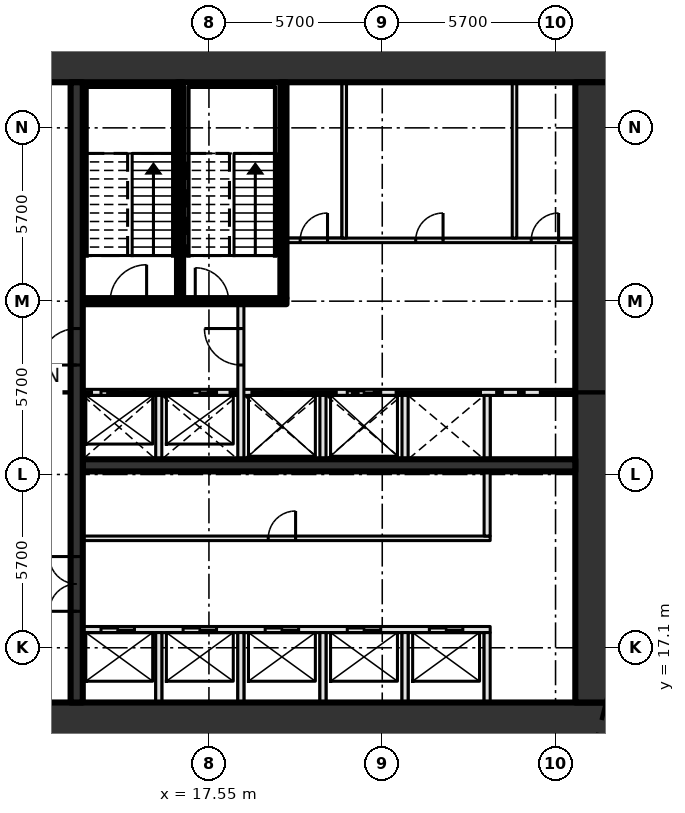
"""IFC4 building model, lengths in metres.
Left out: names, types, materials, properties, quantities, classifications, styles, units other than length and angle.
Written with IfcOpenShell. Run it as: python <this file> out.ifc"""

import sys

from ifc_helpers import new_model, si_unit, direction, frame, frame_2d, origin, place, context, subcontext, project, spatial, rectangle, extrude, element, fill, save


model = new_model("IFC4")
c1 = context("Model", 3, precision=1e-05, world=origin(), true_north=direction((0.0, 1.0)))
c2 = subcontext(c1, "Body", "Model", "MODEL_VIEW")
j1 = project(units=[si_unit("LENGTHUNIT", "METRE"), si_unit("PLANEANGLEUNIT", "RADIAN")], contexts=[c1])
p1 = place(None, origin())
s1 = spatial("IfcSite", under=j1, at=p1, CompositionType="ELEMENT")
p2 = place(p1, origin())
s2 = spatial("IfcBuilding", under=s1, at=p2, CompositionType="ELEMENT")
p3 = place(p2, frame((0.0, 0.0, 23.4)))
s3 = spatial("IfcBuildingStorey", under=s2, at=p3, CompositionType="ELEMENT", Elevation=23.4)
p4 = place(p3, frame((8.0, 14.7, -0.45), z_axis=(0.0, 0.0, 1.0), x_axis=(1.0, 0.0, 0.0)))
e1 = element("IfcWall", 1, at=p4, inside=s3, PredefinedType="SHEAR", context=c2, shape_type="SweptSolid", body=[
    extrude(rectangle(XDim=22.8, YDim=1.2, at=frame_2d((11.4, 0.0))), origin(), (0.0, 0.0, 1.0), 4.8),
])
p5 = place(p4, frame((2.3, 0.0, 0.45)))
e2 = element("IfcOpeningElement", 2, at=p5, cuts=e1, PredefinedType="OPENING", context=c2, shape_type="SweptSolid", body=[
    extrude(rectangle(XDim=1.8, YDim=2.1, at=frame_2d((0.9, 1.05))), frame((0.0, 0.61, 0.0), z_axis=(0.0, -1.0, 0.0), x_axis=(1.0, 0.0, 0.0)), (0.0, 0.0, 1.0), 1.22),
])
p6 = place(p3, frame((8.0, 36.3, -0.45), z_axis=(0.0, 0.0, 1.0), x_axis=(1.0, 0.0, 0.0)))
e3 = element("IfcWall", 3, at=p6, inside=s3, PredefinedType="SHEAR", context=c2, shape_type="SweptSolid", body=[
    extrude(rectangle(XDim=22.8, YDim=1.2, at=frame_2d((11.4, 0.0))), origin(), (0.0, 0.0, 1.0), 4.8),
])
p7 = place(p6, frame((2.3, 0.0, 0.45)))
e4 = element("IfcOpeningElement", 4, at=p7, cuts=e3, PredefinedType="OPENING", context=c2, shape_type="SweptSolid", body=[
    extrude(rectangle(XDim=1.8, YDim=2.1, at=frame_2d((0.9, 1.05))), frame((0.0, 0.61, 0.0), z_axis=(0.0, -1.0, 0.0), x_axis=(1.0, 0.0, 0.0)), (0.0, 0.0, 1.0), 1.22),
])
p8 = place(p3, frame((30.2, 15.3, -0.45), z_axis=(0.0, 0.0, 1.0), x_axis=(0.0, 1.0, 0.0)))
e5 = element("IfcWall", 5, at=p8, inside=s3, PredefinedType="SHEAR", context=c2, shape_type="SweptSolid", body=[
    extrude(rectangle(XDim=20.4, YDim=1.2, at=frame_2d((10.2, 0.0))), origin(), (0.0, 0.0, 1.0), 4.8),
])
p9 = place(p3, frame((13.4, 17.7, 0.0), z_axis=(0.0, 0.0, 1.0), x_axis=(1.0, 0.0, 0.0)))
e6 = element("IfcWall", 6, at=p9, inside=s3, PredefinedType="SOLIDWALL", context=c2, shape_type="SweptSolid", body=[
    extrude(rectangle(XDim=13.4, YDim=0.2, at=frame_2d((6.7, 0.0))), origin(), (0.0, 0.0, 1.0), 4.35),
])
p10 = place(p9, frame((0.6, 0.0, 0.0)))
e7 = element("IfcOpeningElement", 7, at=p10, cuts=e6, PredefinedType="OPENING", context=c2, shape_type="SweptSolid", body=[
    extrude(rectangle(XDim=1.1, YDim=2.1, at=frame_2d((0.55, 1.05))), frame((0.0, 0.11, 0.0), z_axis=(0.0, -1.0, 0.0), x_axis=(1.0, 0.0, 0.0)), (0.0, 0.0, 1.0), 0.22),
])
p11 = place(p9, frame((3.3, 0.0, 0.0)))
e8 = element("IfcOpeningElement", 8, at=p11, cuts=e6, PredefinedType="OPENING", context=c2, shape_type="SweptSolid", body=[
    extrude(rectangle(XDim=1.1, YDim=2.1, at=frame_2d((0.55, 1.05))), frame((0.0, 0.11, 0.0), z_axis=(0.0, -1.0, 0.0), x_axis=(1.0, 0.0, 0.0)), (0.0, 0.0, 1.0), 0.22),
])
p12 = place(p9, frame((6.0, 0.0, 0.0)))
e9 = element("IfcOpeningElement", 9, at=p12, cuts=e6, PredefinedType="OPENING", context=c2, shape_type="SweptSolid", body=[
    extrude(rectangle(XDim=1.1, YDim=2.1, at=frame_2d((0.55, 1.05))), frame((0.0, 0.11, 0.0), z_axis=(0.0, -1.0, 0.0), x_axis=(1.0, 0.0, 0.0)), (0.0, 0.0, 1.0), 0.22),
])
p13 = place(p9, frame((8.7, 0.0, 0.0)))
e10 = element("IfcOpeningElement", 10, at=p13, cuts=e6, PredefinedType="OPENING", context=c2, shape_type="SweptSolid", body=[
    extrude(rectangle(XDim=1.1, YDim=2.1, at=frame_2d((0.55, 1.05))), frame((0.0, 0.11, 0.0), z_axis=(0.0, -1.0, 0.0), x_axis=(1.0, 0.0, 0.0)), (0.0, 0.0, 1.0), 0.22),
])
p14 = place(p9, frame((11.4, 0.0, 0.0)))
e11 = element("IfcOpeningElement", 11, at=p14, cuts=e6, PredefinedType="OPENING", context=c2, shape_type="SweptSolid", body=[
    extrude(rectangle(XDim=1.1, YDim=2.1, at=frame_2d((0.55, 1.05))), frame((0.0, 0.11, 0.0), z_axis=(0.0, -1.0, 0.0), x_axis=(1.0, 0.0, 0.0)), (0.0, 0.0, 1.0), 0.22),
])
p15 = place(p3, frame((13.4, 20.7, 0.0), z_axis=(0.0, 0.0, 1.0), x_axis=(1.0, 0.0, 0.0)))
e12 = element("IfcWall", 12, at=p15, inside=s3, PredefinedType="PARTITIONING", context=c2, shape_type="SweptSolid", body=[
    extrude(rectangle(XDim=13.4, YDim=0.15, at=frame_2d((6.7, 0.0))), origin(), (0.0, 0.0, 1.0), 4.35),
])
p16 = place(p15, frame((6.1, 0.0, 0.0)))
e13 = element("IfcOpeningElement", 13, at=p16, cuts=e12, PredefinedType="OPENING", context=c2, shape_type="SweptSolid", body=[
    extrude(rectangle(XDim=0.9, YDim=2.1, at=frame_2d((0.45, 1.05))), frame((0.0, 0.085, 0.0), z_axis=(0.0, -1.0, 0.0), x_axis=(1.0, 0.0, 0.0)), (0.0, 0.0, 1.0), 0.17),
])
p17 = place(p3, frame((13.4, 23.1, 0.0), z_axis=(0.0, 0.0, 1.0), x_axis=(1.0, 0.0, 0.0)))
e14 = element("IfcWall", 14, at=p17, inside=s3, PredefinedType="SHEAR", context=c2, shape_type="SweptSolid", body=[
    extrude(rectangle(XDim=16.2, YDim=0.4, at=frame_2d((8.1, 0.0))), origin(), (0.0, 0.0, 1.0), 4.35),
])
p18 = place(p3, frame((13.4, 25.5, 0.0), z_axis=(0.0, 0.0, 1.0), x_axis=(1.0, 0.0, 0.0)))
e15 = element("IfcWall", 15, at=p18, inside=s3, PredefinedType="SOLIDWALL", context=c2, shape_type="SweptSolid", body=[
    extrude(rectangle(XDim=16.2, YDim=0.2, at=frame_2d((8.1, 0.0))), origin(), (0.0, 0.0, 1.0), 4.35),
])
p19 = place(p18, frame((0.6, 0.0, 0.0)))
e16 = element("IfcOpeningElement", 16, at=p19, cuts=e15, PredefinedType="OPENING", context=c2, shape_type="SweptSolid", body=[
    extrude(rectangle(XDim=1.1, YDim=2.1, at=frame_2d((0.55, 1.05))), frame((0.0, 0.11, 0.0), z_axis=(0.0, -1.0, 0.0), x_axis=(1.0, 0.0, 0.0)), (0.0, 0.0, 1.0), 0.22),
])
p20 = place(p18, frame((3.3, 0.0, 0.0)))
e17 = element("IfcOpeningElement", 17, at=p20, cuts=e15, PredefinedType="OPENING", context=c2, shape_type="SweptSolid", body=[
    extrude(rectangle(XDim=1.1, YDim=2.1, at=frame_2d((0.55, 1.05))), frame((0.0, 0.11, 0.0), z_axis=(0.0, -1.0, 0.0), x_axis=(1.0, 0.0, 0.0)), (0.0, 0.0, 1.0), 0.22),
])
p21 = place(p18, frame((6.0, 0.0, 0.0)))
e18 = element("IfcOpeningElement", 18, at=p21, cuts=e15, PredefinedType="OPENING", context=c2, shape_type="SweptSolid", body=[
    extrude(rectangle(XDim=1.1, YDim=2.1, at=frame_2d((0.55, 1.05))), frame((0.0, 0.11, 0.0), z_axis=(0.0, -1.0, 0.0), x_axis=(1.0, 0.0, 0.0)), (0.0, 0.0, 1.0), 0.22),
])
p22 = place(p18, frame((8.7, 0.0, 0.0)))
e19 = element("IfcOpeningElement", 19, at=p22, cuts=e15, PredefinedType="OPENING", context=c2, shape_type="SweptSolid", body=[
    extrude(rectangle(XDim=1.1, YDim=2.1, at=frame_2d((0.55, 1.05))), frame((0.0, 0.11, 0.0), z_axis=(0.0, -1.0, 0.0), x_axis=(1.0, 0.0, 0.0)), (0.0, 0.0, 1.0), 0.22),
])
p23 = place(p3, frame((13.4, 28.5, 0.0), z_axis=(0.0, 0.0, 1.0), x_axis=(1.0, 0.0, 0.0)))
e20 = element("IfcWall", 20, at=p23, inside=s3, PredefinedType="SOLIDWALL", context=c2, shape_type="SweptSolid", body=[
    extrude(rectangle(XDim=6.7, YDim=0.2, at=frame_2d((3.35, 0.0))), origin(), (0.0, 0.0, 1.0), 4.35),
])
p24 = place(p23, frame((0.9, 0.0, 0.0)))
e21 = element("IfcOpeningElement", 21, at=p24, cuts=e20, PredefinedType="OPENING", context=c2, shape_type="SweptSolid", body=[
    extrude(rectangle(XDim=1.2, YDim=2.1, at=frame_2d((0.6, 1.05))), frame((0.0, 0.11, 0.0), z_axis=(0.0, -1.0, 0.0), x_axis=(1.0, 0.0, 0.0)), (0.0, 0.0, 1.0), 0.22),
])
p25 = place(p23, frame((3.7, 0.0, 0.0)))
e22 = element("IfcOpeningElement", 22, at=p25, cuts=e20, PredefinedType="OPENING", context=c2, shape_type="SweptSolid", body=[
    extrude(rectangle(XDim=1.1, YDim=2.1, at=frame_2d((0.55, 1.05))), frame((0.0, 0.11, 0.0), z_axis=(0.0, -1.0, 0.0), x_axis=(1.0, 0.0, 0.0)), (0.0, 0.0, 1.0), 0.22),
])
p26 = place(p3, frame((20.1, 30.5, 0.0), z_axis=(0.0, 0.0, 1.0), x_axis=(1.0, 0.0, 0.0)))
e23 = element("IfcWall", 23, at=p26, inside=s3, PredefinedType="PARTITIONING", context=c2, shape_type="SweptSolid", body=[
    extrude(rectangle(XDim=9.5, YDim=0.15, at=frame_2d((4.75, 0.0))), origin(), (0.0, 0.0, 1.0), 4.35),
])
p27 = place(p26, frame((0.45, 0.0, 0.0)))
e24 = element("IfcOpeningElement", 24, at=p27, cuts=e23, PredefinedType="OPENING", context=c2, shape_type="SweptSolid", body=[
    extrude(rectangle(XDim=0.9, YDim=2.1, at=frame_2d((0.45, 1.05))), frame((0.0, 0.085, 0.0), z_axis=(0.0, -1.0, 0.0), x_axis=(1.0, 0.0, 0.0)), (0.0, 0.0, 1.0), 0.17),
])
p28 = place(p26, frame((4.25, 0.0, 0.0)))
e25 = element("IfcOpeningElement", 25, at=p28, cuts=e23, PredefinedType="OPENING", context=c2, shape_type="SweptSolid", body=[
    extrude(rectangle(XDim=0.9, YDim=2.1, at=frame_2d((0.45, 1.05))), frame((0.0, 0.085, 0.0), z_axis=(0.0, -1.0, 0.0), x_axis=(1.0, 0.0, 0.0)), (0.0, 0.0, 1.0), 0.17),
])
p29 = place(p26, frame((8.05, 0.0, 0.0)))
e26 = element("IfcOpeningElement", 26, at=p29, cuts=e23, PredefinedType="OPENING", context=c2, shape_type="SweptSolid", body=[
    extrude(rectangle(XDim=0.9, YDim=2.1, at=frame_2d((0.45, 1.05))), frame((0.0, 0.085, 0.0), z_axis=(0.0, -1.0, 0.0), x_axis=(1.0, 0.0, 0.0)), (0.0, 0.0, 1.0), 0.17),
])
p30 = place(p3, frame((13.2, 15.3, 0.0), z_axis=(0.0, 0.0, 1.0), x_axis=(0.0, 1.0, 0.0)))
e27 = element("IfcWall", 27, at=p30, inside=s3, PredefinedType="SHEAR", context=c2, shape_type="SweptSolid", body=[
    extrude(rectangle(XDim=20.4, YDim=0.4, at=frame_2d((10.2, 0.0))), origin(), (0.0, 0.0, 1.0), 4.35),
])
p31 = place(p30, frame((3.0, 0.0, 0.0)))
e28 = element("IfcOpeningElement", 28, at=p31, cuts=e27, PredefinedType="OPENING", context=c2, shape_type="SweptSolid", body=[
    extrude(rectangle(XDim=1.8, YDim=2.1, at=frame_2d((0.9, 1.05))), frame((0.0, 0.21, 0.0), z_axis=(0.0, -1.0, 0.0), x_axis=(1.0, 0.0, 0.0)), (0.0, 0.0, 1.0), 0.42),
])
p32 = place(p30, frame((11.1, 0.0, 0.0)))
e29 = element("IfcOpeningElement", 29, at=p32, cuts=e27, PredefinedType="OPENING", context=c2, shape_type="SweptSolid", body=[
    extrude(rectangle(XDim=1.2, YDim=2.1, at=frame_2d((0.6, 1.05))), frame((0.0, 0.21, 0.0), z_axis=(0.0, -1.0, 0.0), x_axis=(1.0, 0.0, 0.0)), (0.0, 0.0, 1.0), 0.42),
])
p33 = place(p3, frame((15.9, 15.3, 0.0), z_axis=(0.0, 0.0, 1.0), x_axis=(0.0, 1.0, 0.0)))
e30 = element("IfcWall", 30, at=p33, inside=s3, PredefinedType="SOLIDWALL", context=c2, shape_type="SweptSolid", body=[
    extrude(rectangle(XDim=2.3, YDim=0.2, at=frame_2d((1.15, 0.0))), origin(), (0.0, 0.0, 1.0), 4.35),
])
p34 = place(p3, frame((15.9, 23.3, 0.0), z_axis=(0.0, 0.0, 1.0), x_axis=(0.0, 1.0, 0.0)))
e31 = element("IfcWall", 31, at=p34, inside=s3, PredefinedType="SOLIDWALL", context=c2, shape_type="SweptSolid", body=[
    extrude(rectangle(XDim=2.1, YDim=0.2, at=frame_2d((1.05, 0.0))), origin(), (0.0, 0.0, 1.0), 4.35),
])
p35 = place(p3, frame((16.6, 28.6, 0.0), z_axis=(0.0, 0.0, 1.0), x_axis=(0.0, 1.0, 0.0)))
e32 = element("IfcWall", 32, at=p35, inside=s3, PredefinedType="SOLIDWALL", context=c2, shape_type="SweptSolid", body=[
    extrude(rectangle(XDim=7.1, YDim=0.2, at=frame_2d((3.55, 0.0))), origin(), (0.0, 0.0, 1.0), 4.35),
])
p36 = place(p3, frame((18.6, 15.3, 0.0), z_axis=(0.0, 0.0, 1.0), x_axis=(0.0, 1.0, 0.0)))
e33 = element("IfcWall", 33, at=p36, inside=s3, PredefinedType="SOLIDWALL", context=c2, shape_type="SweptSolid", body=[
    extrude(rectangle(XDim=2.3, YDim=0.2, at=frame_2d((1.15, 0.0))), origin(), (0.0, 0.0, 1.0), 4.35),
])
p37 = place(p3, frame((18.6, 23.3, 0.0), z_axis=(0.0, 0.0, 1.0), x_axis=(0.0, 1.0, 0.0)))
e34 = element("IfcWall", 34, at=p37, inside=s3, PredefinedType="SOLIDWALL", context=c2, shape_type="SweptSolid", body=[
    extrude(rectangle(XDim=5.1, YDim=0.2, at=frame_2d((2.55, 0.0))), origin(), (0.0, 0.0, 1.0), 4.35),
])
p38 = place(p37, frame((3.1, 0.0, 0.0)))
e35 = element("IfcOpeningElement", 35, at=p38, cuts=e34, PredefinedType="OPENING", context=c2, shape_type="SweptSolid", body=[
    extrude(rectangle(XDim=1.2, YDim=2.1, at=frame_2d((0.6, 1.05))), frame((0.0, 0.11, 0.0), z_axis=(0.0, -1.0, 0.0), x_axis=(1.0, 0.0, 0.0)), (0.0, 0.0, 1.0), 0.22),
])
p39 = place(p3, frame((20.0, 28.6, 0.0), z_axis=(0.0, 0.0, 1.0), x_axis=(0.0, 1.0, 0.0)))
e36 = element("IfcWall", 36, at=p39, inside=s3, PredefinedType="SOLIDWALL", context=c2, shape_type="SweptSolid", body=[
    extrude(rectangle(XDim=7.1, YDim=0.2, at=frame_2d((3.55, 0.0))), origin(), (0.0, 0.0, 1.0), 4.35),
])
p40 = place(p3, frame((21.3, 15.3, 0.0), z_axis=(0.0, 0.0, 1.0), x_axis=(0.0, 1.0, 0.0)))
e37 = element("IfcWall", 37, at=p40, inside=s3, PredefinedType="SOLIDWALL", context=c2, shape_type="SweptSolid", body=[
    extrude(rectangle(XDim=2.3, YDim=0.2, at=frame_2d((1.15, 0.0))), origin(), (0.0, 0.0, 1.0), 4.35),
])
p41 = place(p3, frame((21.3, 23.3, 0.0), z_axis=(0.0, 0.0, 1.0), x_axis=(0.0, 1.0, 0.0)))
e38 = element("IfcWall", 38, at=p41, inside=s3, PredefinedType="SOLIDWALL", context=c2, shape_type="SweptSolid", body=[
    extrude(rectangle(XDim=2.1, YDim=0.2, at=frame_2d((1.05, 0.0))), origin(), (0.0, 0.0, 1.0), 4.35),
])
p42 = place(p3, frame((22.0, 30.575, 0.0), z_axis=(0.0, 0.0, 1.0), x_axis=(0.0, 1.0, 0.0)))
e39 = element("IfcWall", 39, at=p42, inside=s3, PredefinedType="PARTITIONING", context=c2, shape_type="SweptSolid", body=[
    extrude(rectangle(XDim=5.125, YDim=0.15, at=frame_2d((2.562, 0.0))), origin(), (0.0, 0.0, 1.0), 4.35),
])
p43 = place(p3, frame((24.0, 15.3, 0.0), z_axis=(0.0, 0.0, 1.0), x_axis=(0.0, 1.0, 0.0)))
e40 = element("IfcWall", 40, at=p43, inside=s3, PredefinedType="SOLIDWALL", context=c2, shape_type="SweptSolid", body=[
    extrude(rectangle(XDim=2.3, YDim=0.2, at=frame_2d((1.15, 0.0))), origin(), (0.0, 0.0, 1.0), 4.35),
])
p44 = place(p3, frame((24.0, 23.3, 0.0), z_axis=(0.0, 0.0, 1.0), x_axis=(0.0, 1.0, 0.0)))
e41 = element("IfcWall", 41, at=p44, inside=s3, PredefinedType="SOLIDWALL", context=c2, shape_type="SweptSolid", body=[
    extrude(rectangle(XDim=2.1, YDim=0.2, at=frame_2d((1.05, 0.0))), origin(), (0.0, 0.0, 1.0), 4.35),
])
p45 = place(p3, frame((26.7, 15.3, 0.0), z_axis=(0.0, 0.0, 1.0), x_axis=(0.0, 1.0, 0.0)))
e42 = element("IfcWall", 42, at=p45, inside=s3, PredefinedType="SOLIDWALL", context=c2, shape_type="SweptSolid", body=[
    extrude(rectangle(XDim=2.3, YDim=0.2, at=frame_2d((1.15, 0.0))), origin(), (0.0, 0.0, 1.0), 4.35),
])
p46 = place(p3, frame((26.7, 20.775, 0.0), z_axis=(0.0, 0.0, 1.0), x_axis=(0.0, 1.0, 0.0)))
e43 = element("IfcWall", 43, at=p46, inside=s3, PredefinedType="SOLIDWALL", context=c2, shape_type="SweptSolid", body=[
    extrude(rectangle(XDim=4.625, YDim=0.2, at=frame_2d((2.312, 0.0))), origin(), (0.0, 0.0, 1.0), 4.35),
])
p47 = place(p3, frame((27.6, 30.575, 0.0), z_axis=(0.0, 0.0, 1.0), x_axis=(0.0, 1.0, 0.0)))
e44 = element("IfcWall", 44, at=p47, inside=s3, PredefinedType="PARTITIONING", context=c2, shape_type="SweptSolid", body=[
    extrude(rectangle(XDim=5.125, YDim=0.15, at=frame_2d((2.562, 0.0))), origin(), (0.0, 0.0, 1.0), 4.35),
])
p48 = place(p10, origin())
e45 = element("IfcDoor", 45, at=p48, inside=s3, OperationType="SLIDING_TO_LEFT", PredefinedType="DOOR", context=c2, shape_type="SweptSolid", body=[
    extrude(rectangle(XDim=1.1, YDim=2.1, at=frame_2d((0.55, 1.05))), frame((0.0, 0.025, 0.0), z_axis=(0.0, -1.0, 0.0), x_axis=(1.0, 0.0, 0.0)), (0.0, 0.0, 1.0), 0.05),
])
fill(e7, e45)
p49 = place(p11, origin())
e46 = element("IfcDoor", 46, at=p49, inside=s3, OperationType="SLIDING_TO_LEFT", PredefinedType="DOOR", context=c2, shape_type="SweptSolid", body=[
    extrude(rectangle(XDim=1.1, YDim=2.1, at=frame_2d((0.55, 1.05))), frame((0.0, 0.025, 0.0), z_axis=(0.0, -1.0, 0.0), x_axis=(1.0, 0.0, 0.0)), (0.0, 0.0, 1.0), 0.05),
])
fill(e8, e46)
p50 = place(p12, origin())
e47 = element("IfcDoor", 47, at=p50, inside=s3, OperationType="SLIDING_TO_LEFT", PredefinedType="DOOR", context=c2, shape_type="SweptSolid", body=[
    extrude(rectangle(XDim=1.1, YDim=2.1, at=frame_2d((0.55, 1.05))), frame((0.0, 0.025, 0.0), z_axis=(0.0, -1.0, 0.0), x_axis=(1.0, 0.0, 0.0)), (0.0, 0.0, 1.0), 0.05),
])
fill(e9, e47)
p51 = place(p13, origin())
e48 = element("IfcDoor", 48, at=p51, inside=s3, OperationType="SLIDING_TO_LEFT", PredefinedType="DOOR", context=c2, shape_type="SweptSolid", body=[
    extrude(rectangle(XDim=1.1, YDim=2.1, at=frame_2d((0.55, 1.05))), frame((0.0, 0.025, 0.0), z_axis=(0.0, -1.0, 0.0), x_axis=(1.0, 0.0, 0.0)), (0.0, 0.0, 1.0), 0.05),
])
fill(e10, e48)
p52 = place(p14, origin())
e49 = element("IfcDoor", 49, at=p52, inside=s3, OperationType="SLIDING_TO_LEFT", PredefinedType="DOOR", context=c2, shape_type="SweptSolid", body=[
    extrude(rectangle(XDim=1.1, YDim=2.1, at=frame_2d((0.55, 1.05))), frame((0.0, 0.025, 0.0), z_axis=(0.0, -1.0, 0.0), x_axis=(1.0, 0.0, 0.0)), (0.0, 0.0, 1.0), 0.05),
])
fill(e11, e49)
p53 = place(p19, origin())
e50 = element("IfcDoor", 50, at=p53, inside=s3, OperationType="SLIDING_TO_LEFT", PredefinedType="DOOR", context=c2, shape_type="SweptSolid", body=[
    extrude(rectangle(XDim=1.1, YDim=2.1, at=frame_2d((0.55, 1.05))), frame((0.0, 0.025, 0.0), z_axis=(0.0, -1.0, 0.0), x_axis=(1.0, 0.0, 0.0)), (0.0, 0.0, 1.0), 0.05),
])
fill(e16, e50)
p54 = place(p20, origin())
e51 = element("IfcDoor", 51, at=p54, inside=s3, OperationType="SLIDING_TO_LEFT", PredefinedType="DOOR", context=c2, shape_type="SweptSolid", body=[
    extrude(rectangle(XDim=1.1, YDim=2.1, at=frame_2d((0.55, 1.05))), frame((0.0, 0.025, 0.0), z_axis=(0.0, -1.0, 0.0), x_axis=(1.0, 0.0, 0.0)), (0.0, 0.0, 1.0), 0.05),
])
fill(e17, e51)
p55 = place(p21, origin())
e52 = element("IfcDoor", 52, at=p55, inside=s3, OperationType="SLIDING_TO_LEFT", PredefinedType="DOOR", context=c2, shape_type="SweptSolid", body=[
    extrude(rectangle(XDim=1.1, YDim=2.1, at=frame_2d((0.55, 1.05))), frame((0.0, 0.025, 0.0), z_axis=(0.0, -1.0, 0.0), x_axis=(1.0, 0.0, 0.0)), (0.0, 0.0, 1.0), 0.05),
])
fill(e18, e52)
p56 = place(p22, origin())
e53 = element("IfcDoor", 53, at=p56, inside=s3, OperationType="SLIDING_TO_LEFT", PredefinedType="DOOR", context=c2, shape_type="SweptSolid", body=[
    extrude(rectangle(XDim=1.1, YDim=2.1, at=frame_2d((0.55, 1.05))), frame((0.0, 0.025, 0.0), z_axis=(0.0, -1.0, 0.0), x_axis=(1.0, 0.0, 0.0)), (0.0, 0.0, 1.0), 0.05),
])
fill(e19, e53)
p57 = place(p16, origin())
e54 = element("IfcDoor", 54, at=p57, inside=s3, OperationType="SINGLE_SWING_RIGHT", PredefinedType="DOOR", context=c2, shape_type="SweptSolid", body=[
    extrude(rectangle(XDim=0.9, YDim=2.1, at=frame_2d((0.45, 1.05))), frame((0.0, 0.025, 0.0), z_axis=(0.0, -1.0, 0.0), x_axis=(1.0, 0.0, 0.0)), (0.0, 0.0, 1.0), 0.05),
])
fill(e13, e54)
p58 = place(p27, origin())
e55 = element("IfcDoor", 55, at=p58, inside=s3, OperationType="SINGLE_SWING_RIGHT", PredefinedType="DOOR", context=c2, shape_type="SweptSolid", body=[
    extrude(rectangle(XDim=0.9, YDim=2.1, at=frame_2d((0.45, 1.05))), frame((0.0, 0.025, 0.0), z_axis=(0.0, -1.0, 0.0), x_axis=(1.0, 0.0, 0.0)), (0.0, 0.0, 1.0), 0.05),
])
fill(e24, e55)
p59 = place(p28, origin())
e56 = element("IfcDoor", 56, at=p59, inside=s3, OperationType="SINGLE_SWING_RIGHT", PredefinedType="DOOR", context=c2, shape_type="SweptSolid", body=[
    extrude(rectangle(XDim=0.9, YDim=2.1, at=frame_2d((0.45, 1.05))), frame((0.0, 0.025, 0.0), z_axis=(0.0, -1.0, 0.0), x_axis=(1.0, 0.0, 0.0)), (0.0, 0.0, 1.0), 0.05),
])
fill(e25, e56)
p60 = place(p29, origin())
e57 = element("IfcDoor", 57, at=p60, inside=s3, OperationType="SINGLE_SWING_RIGHT", PredefinedType="DOOR", context=c2, shape_type="SweptSolid", body=[
    extrude(rectangle(XDim=0.9, YDim=2.1, at=frame_2d((0.45, 1.05))), frame((0.0, 0.025, 0.0), z_axis=(0.0, -1.0, 0.0), x_axis=(1.0, 0.0, 0.0)), (0.0, 0.0, 1.0), 0.05),
])
fill(e26, e57)
p61 = place(p24, origin())
e58 = element("IfcDoor", 58, at=p61, inside=s3, OperationType="SINGLE_SWING_RIGHT", PredefinedType="DOOR", context=c2, shape_type="SweptSolid", body=[
    extrude(rectangle(XDim=1.2, YDim=2.1, at=frame_2d((0.6, 1.05))), frame((0.0, 0.025, 0.0), z_axis=(0.0, -1.0, 0.0), x_axis=(1.0, 0.0, 0.0)), (0.0, 0.0, 1.0), 0.05),
])
fill(e21, e58)
p62 = place(p25, origin())
e59 = element("IfcDoor", 59, at=p62, inside=s3, OperationType="SINGLE_SWING_LEFT", PredefinedType="DOOR", context=c2, shape_type="SweptSolid", body=[
    extrude(rectangle(XDim=1.1, YDim=2.1, at=frame_2d((0.55, 1.05))), frame((0.0, 0.025, 0.0), z_axis=(0.0, -1.0, 0.0), x_axis=(1.0, 0.0, 0.0)), (0.0, 0.0, 1.0), 0.05),
])
fill(e22, e59)
p63 = place(p31, origin())
e60 = element("IfcDoor", 60, at=p63, inside=s3, OperationType="DOUBLE_DOOR_SINGLE_SWING", PredefinedType="DOOR", context=c2, shape_type="SweptSolid", body=[
    extrude(rectangle(XDim=1.8, YDim=2.1, at=frame_2d((0.9, 1.05))), frame((0.0, 0.025, 0.0), z_axis=(0.0, -1.0, 0.0), x_axis=(1.0, 0.0, 0.0)), (0.0, 0.0, 1.0), 0.05),
])
fill(e28, e60)
p64 = place(p32, origin())
e61 = element("IfcDoor", 61, at=p64, inside=s3, OperationType="SINGLE_SWING_LEFT", PredefinedType="DOOR", context=c2, shape_type="SweptSolid", body=[
    extrude(rectangle(XDim=1.2, YDim=2.1, at=frame_2d((0.6, 1.05))), frame((0.0, 0.025, 0.0), z_axis=(0.0, -1.0, 0.0), x_axis=(1.0, 0.0, 0.0)), (0.0, 0.0, 1.0), 0.05),
])
fill(e29, e61)
p65 = place(p38, origin())
e62 = element("IfcDoor", 62, at=p65, inside=s3, OperationType="SINGLE_SWING_RIGHT", PredefinedType="DOOR", context=c2, shape_type="SweptSolid", body=[
    extrude(rectangle(XDim=1.2, YDim=2.1, at=frame_2d((0.6, 1.05))), frame((0.0, 0.025, 0.0), z_axis=(0.0, -1.0, 0.0), x_axis=(1.0, 0.0, 0.0)), (0.0, 0.0, 1.0), 0.05),
])
fill(e35, e62)
save(model, sys.argv[1])
